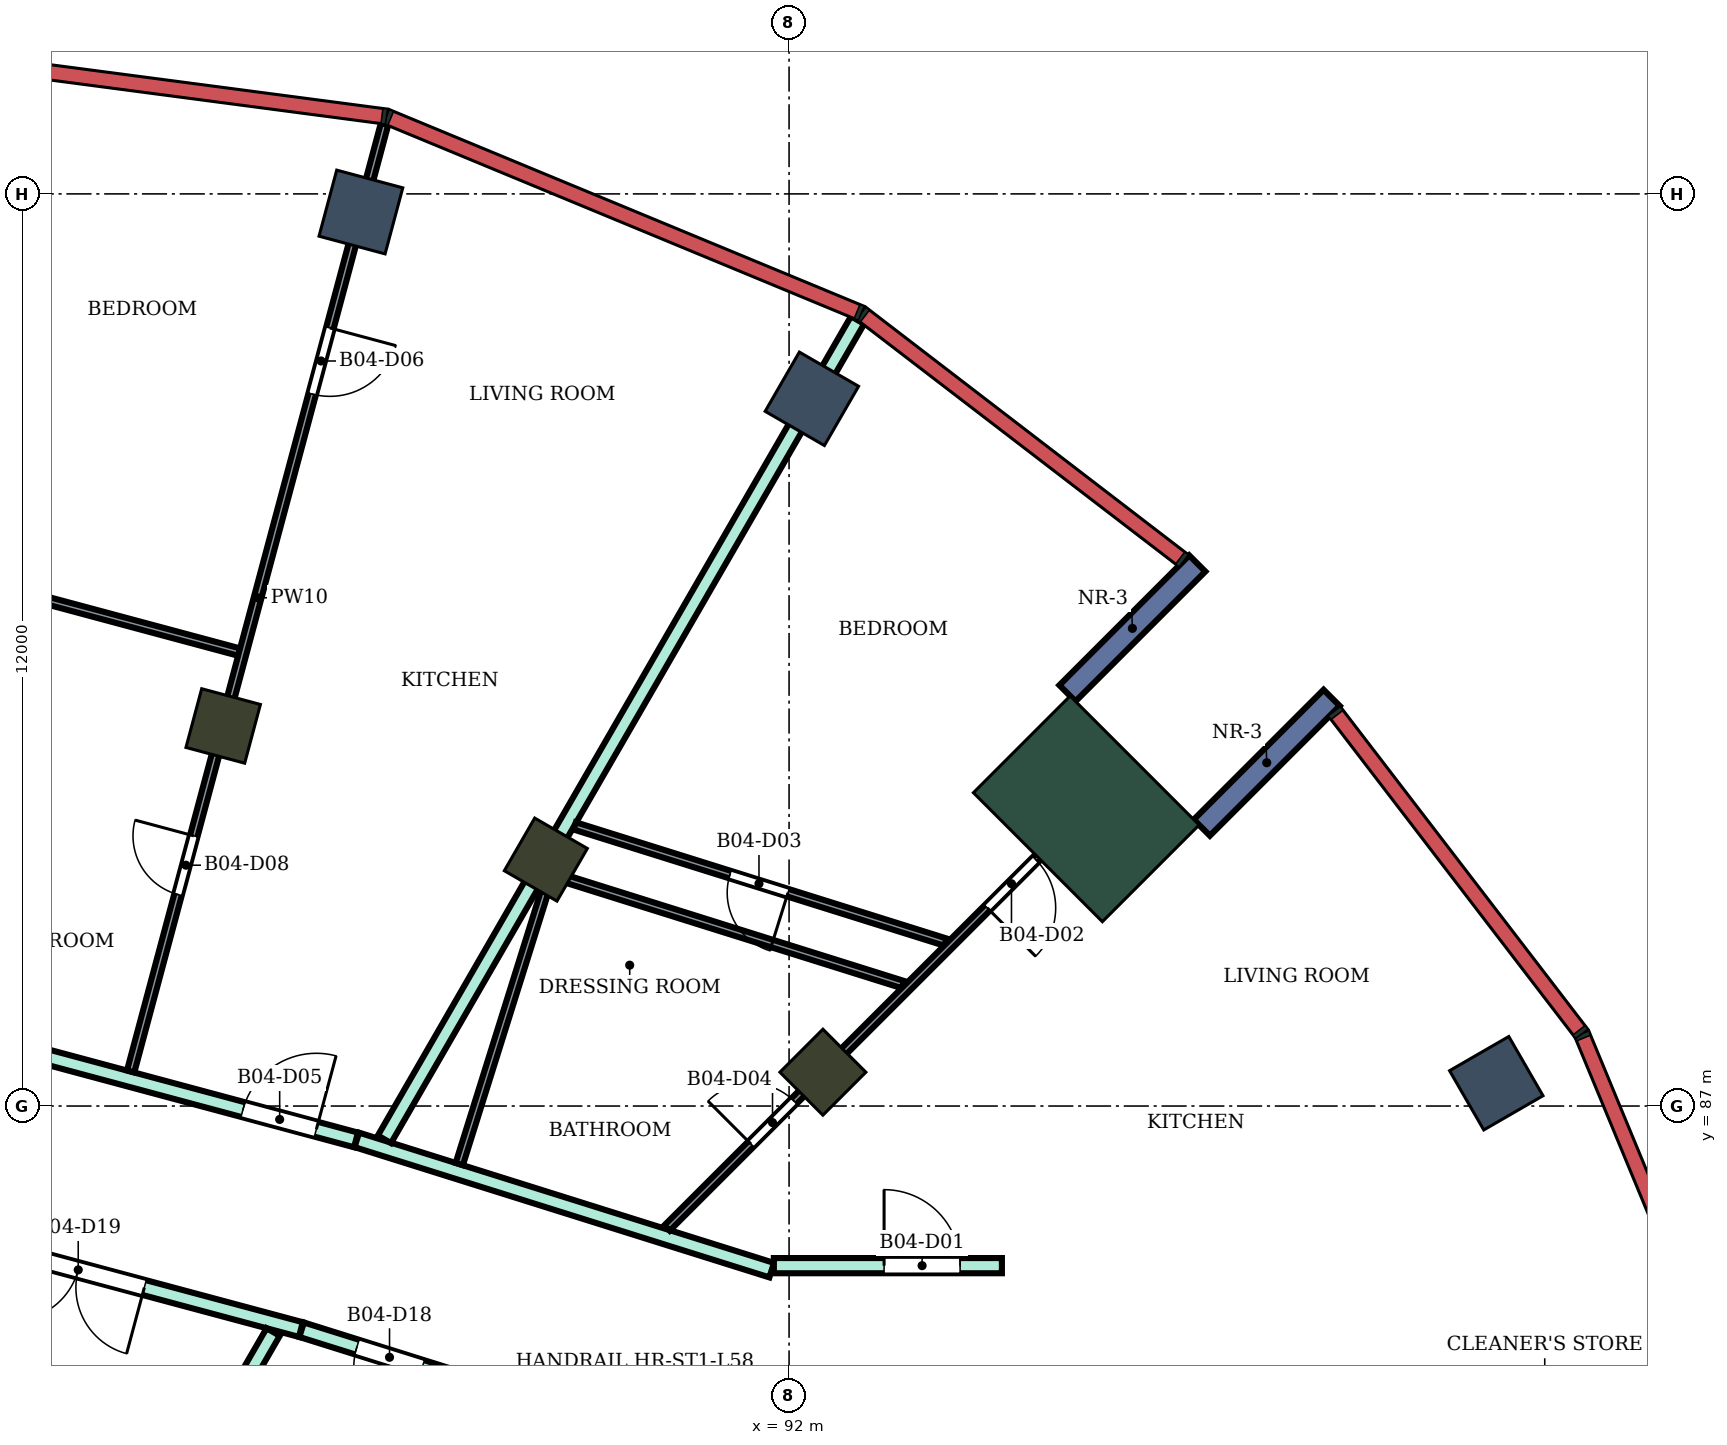
"""IFC4 building model, lengths in metres.
Left out: names, types, materials, properties, quantities, classifications, styles, units other than length and angle.
Written with IfcOpenShell. Run it as: python <this file> out.ifc"""

import sys

from ifc_helpers import new_model, si_unit, direction, frame, frame_2d, origin, origin_2d, place, context, subcontext, project, spatial, rectangle, extrude, element, fill, save


model = new_model("IFC4")
c1 = context("Model", 3, precision=1e-05, world=origin(), true_north=direction((0.0, 1.0)))
c2 = subcontext(c1, "Body", "Model", "MODEL_VIEW")
j1 = project(units=[si_unit("LENGTHUNIT", "METRE"), si_unit("PLANEANGLEUNIT", "RADIAN")], contexts=[c1])
p1 = place(None, origin())
s1 = spatial("IfcSite", under=j1, at=p1, CompositionType="ELEMENT")
p2 = place(p1, origin())
s2 = spatial("IfcBuilding", under=s1, at=p2, CompositionType="ELEMENT")
p3 = place(p2, frame((0.0, 0.0, 254.1)))
s3 = spatial("IfcBuildingStorey", under=s2, at=p3, CompositionType="ELEMENT", Elevation=254.1)
for number, where, z_axis, x_axis in (
    (1, (101.304, 87.3, 0.0), (0.0, 0.0, 1.0), (0.866, 0.5, 0.0)),
    (2, (92.3, 96.304, 0.0), (0.0, 0.0, 1.0), (0.5, 0.866, 0.0)),
    (3, (86.367, 98.762, 0.0), (0.0, 0.0, 1.0), (0.259, 0.966, 0.0)),
):
    element("IfcColumn", number, at=place(p3, frame(where, z_axis=z_axis, x_axis=x_axis)), inside=s3, PredefinedType="COLUMN", context=c2, shape_type="SweptSolid", body=[
        extrude(rectangle(XDim=0.9, YDim=0.9, at=origin_2d()), origin(), (0.0, 0.0, 1.0), 4.2),
    ])
for number, where, z_axis, x_axis in (
    (4, (92.445, 87.445, 0.0), (0.0, 0.0, 1.0), (0.707, 0.707, 0.0)),
    (5, (88.8, 90.242, 0.0), (0.0, 0.0, 1.0), (0.5, 0.866, 0.0)),
    (6, (84.555, 92.0, 0.0), (0.0, 0.0, 1.0), (0.259, 0.966, 0.0)),
):
    element("IfcColumn", number, at=place(p3, frame(where, z_axis=z_axis, x_axis=x_axis)), inside=s3, PredefinedType="COLUMN", context=c2, shape_type="SweptSolid", body=[
        extrude(rectangle(XDim=0.8, YDim=0.8, at=origin_2d()), origin(), (0.0, 0.0, 1.0), 4.2),
    ])
p4 = place(p3, frame((95.91, 90.91, 0.0), z_axis=(0.0, 0.0, 1.0), x_axis=(0.707106781187, 0.707106781187, 0.0)))
e7 = element("IfcColumn", 7, at=p4, inside=s3, PredefinedType="COLUMN", context=c2, shape_type="SweptSolid", body=[
    extrude(rectangle(XDim=1.8, YDim=2.4, at=origin_2d()), origin(), (0.0, 0.0, 1.0), 4.2),
])
for number, where, z_axis, x_axis in (
    (8, (97.43, 90.662, 0.0), (0.0, 0.0, 1.0), (0.707, 0.707, 0.0)),
    (9, (95.662, 92.43, 0.0), (0.0, 0.0, 1.0), (0.707, 0.707, 0.0)),
):
    element("IfcWall", number, at=place(p3, frame(where, z_axis=z_axis, x_axis=x_axis)), inside=s3, PredefinedType="NOTDEFINED", context=c2, shape_type="SweptSolid", body=[
        extrude(rectangle(XDim=2.416, YDim=0.3, at=frame_2d((1.208, 0.0))), origin(), (0.0, 0.0, 1.0), 4.2),
    ])
p5 = place(p3, frame((80.0, 85.554, 0.0), z_axis=(0.0, 0.0, 1.0), x_axis=(0.965894438951, -0.258936155845, 0.0)))
e10 = element("IfcWall", 10, at=p5, inside=s3, PredefinedType="PARTITIONING", context=c2, shape_type="SweptSolid", body=[
    extrude(rectangle(XDim=5.774, YDim=0.2, at=frame_2d((2.887, 0.0))), origin(), (0.0, 0.0, 1.0), 3.75),
])
p6 = place(p5, frame((1.841, 0.0, 0.0)))
e11 = element("IfcOpeningElement", 11, at=p6, cuts=e10, PredefinedType="OPENING", context=c2, shape_type="SweptSolid", body=[
    extrude(rectangle(XDim=1.8, YDim=2.1, at=frame_2d((0.9, 1.05))), frame((0.0, 0.11, 0.0), z_axis=(0.0, -1.0, 0.0), x_axis=(1.0, 0.0, 0.0)), (0.0, 0.0, 1.0), 0.22),
])
p7 = place(p3, frame((80.048, 88.233, 0.0), z_axis=(0.0, 0.0, 1.0), x_axis=(0.965787353661, -0.259335280109, 0.0)))
e12 = element("IfcWall", 12, at=p7, inside=s3, PredefinedType="PARTITIONING", context=c2, shape_type="SweptSolid", body=[
    extrude(rectangle(XDim=6.476, YDim=0.2, at=frame_2d((3.238, 0.0))), origin(), (0.0, 0.0, 1.0), 3.75),
])
p8 = place(p7, frame((4.936, 0.0, 0.0)))
e13 = element("IfcOpeningElement", 13, at=p8, cuts=e12, PredefinedType="OPENING", context=c2, shape_type="SweptSolid", body=[
    extrude(rectangle(XDim=1.0, YDim=2.1, at=frame_2d((0.5, 1.05))), frame((0.0, 0.11, 0.0), z_axis=(0.0, -1.0, 0.0), x_axis=(1.0, 0.0, 0.0)), (0.0, 0.0, 1.0), 0.22),
])
p9 = place(p3, frame((83.85, 81.668, 0.0), z_axis=(0.0, 0.0, 1.0), x_axis=(0.500099931433, 0.865967700657, 0.0)))
e14 = element("IfcWall", 14, at=p9, inside=s3, PredefinedType="PARTITIONING", context=c2, shape_type="SweptSolid", body=[
    extrude(rectangle(XDim=2.725, YDim=0.2, at=frame_2d((1.362, 0.0))), origin(), (0.0, 0.0, 1.0), 3.75),
])
p10 = place(p3, frame((85.587, 84.057, 0.0), z_axis=(0.0, 0.0, 1.0), x_axis=(0.954239513179, -0.299043393987, 0.0)))
e15 = element("IfcWall", 15, at=p10, inside=s3, PredefinedType="PARTITIONING", context=c2, shape_type="SweptSolid", body=[
    extrude(rectangle(XDim=2.424, YDim=0.2, at=frame_2d((1.212, 0.0))), origin(), (0.0, 0.0, 1.0), 3.75),
])
p11 = place(p10, frame((0.762, 0.0, 0.0)))
e16 = element("IfcOpeningElement", 16, at=p11, cuts=e15, PredefinedType="OPENING", context=c2, shape_type="SweptSolid", body=[
    extrude(rectangle(XDim=0.9, YDim=2.1, at=frame_2d((0.45, 1.05))), frame((0.0, 0.11, 0.0), z_axis=(0.0, -1.0, 0.0), x_axis=(1.0, 0.0, 0.0)), (0.0, 0.0, 1.0), 0.22),
])
p12 = place(p3, frame((86.313, 86.554, 0.0), z_axis=(0.0, 0.0, 1.0), x_axis=(0.954077387881, -0.29956024091, 0.0)))
e17 = element("IfcWall", 17, at=p12, inside=s3, PredefinedType="PARTITIONING", context=c2, shape_type="SweptSolid", body=[
    extrude(rectangle(XDim=5.72, YDim=0.2, at=frame_2d((2.86, 0.0))), origin(), (0.0, 0.0, 1.0), 3.75),
])
p13 = place(p3, frame((86.677, 86.562, 0.0), z_axis=(0.0, 0.0, 1.0), x_axis=(0.500139020429, 0.865945125424, 0.0)))
e18 = element("IfcWall", 18, at=p13, inside=s3, PredefinedType="PARTITIONING", context=c2, shape_type="SweptSolid", body=[
    extrude(rectangle(XDim=12.446, YDim=0.2, at=frame_2d((6.223, 0.0))), origin(), (0.0, 0.0, 1.0), 3.75),
])
p14 = place(p3, frame((91.8, 84.9, 0.0), z_axis=(0.0, 0.0, 1.0), x_axis=(1.0, 0.0, 0.0)))
e19 = element("IfcWall", 19, at=p14, inside=s3, PredefinedType="PARTITIONING", context=c2, shape_type="SweptSolid", body=[
    extrude(rectangle(XDim=3.0, YDim=0.2, at=frame_2d((1.5, 0.0))), origin(), (0.0, 0.0, 1.0), 3.75),
])
p15 = place(p14, frame((1.45, 0.0, 0.0)))
e20 = element("IfcOpeningElement", 20, at=p15, cuts=e19, PredefinedType="OPENING", context=c2, shape_type="SweptSolid", body=[
    extrude(rectangle(XDim=1.0, YDim=2.1, at=frame_2d((0.5, 1.05))), frame((0.0, 0.11, 0.0), z_axis=(0.0, -1.0, 0.0), x_axis=(1.0, 0.0, 0.0)), (0.0, 0.0, 1.0), 0.22),
])
p16 = place(p3, frame((80.058, 94.235, 0.0), z_axis=(0.0, 0.0, 1.0), x_axis=(0.965831212389, -0.259171891173, 0.0)))
e21 = element("IfcWall", 21, at=p16, inside=s3, PredefinedType="PARTITIONING", context=c2, shape_type="SweptSolid", body=[
    extrude(rectangle(XDim=4.872, YDim=0.1, at=frame_2d((2.436, 0.0))), origin(), (0.0, 0.0, 1.0), 3.75),
])
p17 = place(p16, frame((0.792, 0.0, 0.0)))
e22 = element("IfcOpeningElement", 22, at=p17, cuts=e21, PredefinedType="OPENING", context=c2, shape_type="SweptSolid", body=[
    extrude(rectangle(XDim=0.8, YDim=2.1, at=frame_2d((0.4, 1.05))), frame((0.0, 0.06, 0.0), z_axis=(0.0, -1.0, 0.0), x_axis=(1.0, 0.0, 0.0)), (0.0, 0.0, 1.0), 0.12),
])
p18 = place(p3, frame((83.338, 87.455, 0.0), z_axis=(0.0, 0.0, 1.0), x_axis=(0.25886596283, 0.965913253501, 0.0)))
e23 = element("IfcWall", 23, at=p18, inside=s3, PredefinedType="PARTITIONING", context=c2, shape_type="SweptSolid", body=[
    extrude(rectangle(XDim=12.904, YDim=0.1, at=frame_2d((6.452, 0.0))), origin(), (0.0, 0.0, 1.0), 3.75),
])
p19 = place(p18, frame((9.227, 0.0, 0.0)))
e24 = element("IfcOpeningElement", 24, at=p19, cuts=e23, PredefinedType="OPENING", context=c2, shape_type="SweptSolid", body=[
    extrude(rectangle(XDim=0.9, YDim=2.1, at=frame_2d((0.45, 1.05))), frame((0.0, 0.06, 0.0), z_axis=(0.0, -1.0, 0.0), x_axis=(1.0, 0.0, 0.0)), (0.0, 0.0, 1.0), 0.12),
])
p20 = place(p18, frame((2.409, 0.0, 0.0)))
e25 = element("IfcOpeningElement", 25, at=p20, cuts=e23, PredefinedType="OPENING", context=c2, shape_type="SweptSolid", body=[
    extrude(rectangle(XDim=0.8, YDim=2.1, at=frame_2d((0.4, 1.05))), frame((0.0, 0.06, 0.0), z_axis=(0.0, -1.0, 0.0), x_axis=(1.0, 0.0, 0.0)), (0.0, 0.0, 1.0), 0.12),
])
p21 = place(p3, frame((87.661, 86.236, 0.0), z_axis=(0.0, 0.0, 1.0), x_axis=(0.299267255743, 0.954169329648, 0.0)))
e26 = element("IfcWall", 26, at=p21, inside=s3, PredefinedType="PARTITIONING", context=c2, shape_type="SweptSolid", body=[
    extrude(rectangle(XDim=3.95, YDim=0.1, at=frame_2d((1.975, 0.0))), origin(), (0.0, 0.0, 1.0), 3.75),
])
p22 = place(p3, frame((88.858, 90.053, 0.0), z_axis=(0.0, 0.0, 1.0), x_axis=(0.954180222183, -0.299232524294, 0.0)))
e27 = element("IfcWall", 27, at=p22, inside=s3, PredefinedType="PARTITIONING", context=c2, shape_type="SweptSolid", body=[
    extrude(rectangle(XDim=4.863, YDim=0.1, at=frame_2d((2.431, 0.0))), origin(), (0.0, 0.0, 1.0), 3.75),
])
p23 = place(p3, frame((89.18, 90.685, 0.0), z_axis=(0.0, 0.0, 1.0), x_axis=(0.954251036713, -0.299006620215, 0.0)))
e28 = element("IfcWall", 28, at=p23, inside=s3, PredefinedType="PARTITIONING", context=c2, shape_type="SweptSolid", body=[
    extrude(rectangle(XDim=5.111, YDim=0.1, at=frame_2d((2.555, 0.0))), origin(), (0.0, 0.0, 1.0), 3.75),
])
p24 = place(p23, frame((2.14, 0.0, 0.0)))
e29 = element("IfcOpeningElement", 29, at=p24, cuts=e28, PredefinedType="OPENING", context=c2, shape_type="SweptSolid", body=[
    extrude(rectangle(XDim=0.8, YDim=2.1, at=frame_2d((0.4, 1.05))), frame((0.0, 0.06, 0.0), z_axis=(0.0, -1.0, 0.0), x_axis=(1.0, 0.0, 0.0)), (0.0, 0.0, 1.0), 0.12),
])
p25 = place(p3, frame((90.395, 85.395, 0.0), z_axis=(0.0, 0.0, 1.0), x_axis=(0.707279106146, 0.706934414221, 0.0)))
e30 = element("IfcWall", 30, at=p25, inside=s3, PredefinedType="PARTITIONING", context=c2, shape_type="SweptSolid", body=[
    extrude(rectangle(XDim=8.5, YDim=0.1, at=frame_2d((4.25, 0.0))), origin(), (0.0, 0.0, 1.0), 3.75),
])
p26 = place(p25, frame((5.957, 0.0, 0.0)))
e31 = element("IfcOpeningElement", 31, at=p26, cuts=e30, PredefinedType="OPENING", context=c2, shape_type="SweptSolid", body=[
    extrude(rectangle(XDim=0.9, YDim=2.1, at=frame_2d((0.45, 1.05))), frame((0.0, 0.06, 0.0), z_axis=(0.0, -1.0, 0.0), x_axis=(1.0, 0.0, 0.0)), (0.0, 0.0, 1.0), 0.12),
])
p27 = place(p25, frame((1.562, 0.0, 0.0)))
e32 = element("IfcOpeningElement", 32, at=p27, cuts=e30, PredefinedType="OPENING", context=c2, shape_type="SweptSolid", body=[
    extrude(rectangle(XDim=0.8, YDim=2.1, at=frame_2d((0.4, 1.05))), frame((0.0, 0.06, 0.0), z_axis=(0.0, -1.0, 0.0), x_axis=(1.0, 0.0, 0.0)), (0.0, 0.0, 1.0), 0.12),
])
p28 = place(p15, origin())
e33 = element("IfcDoor", 33, at=p28, inside=s3, OperationType="SINGLE_SWING_LEFT", PredefinedType="DOOR", context=c2, shape_type="SweptSolid", body=[
    extrude(rectangle(XDim=1.0, YDim=2.1, at=frame_2d((0.5, 1.05))), frame((0.0, 0.025, 0.0), z_axis=(0.0, -1.0, 0.0), x_axis=(1.0, 0.0, 0.0)), (0.0, 0.0, 1.0), 0.05),
])
fill(e20, e33)
p29 = place(p26, frame((0.9, 0.0, 0.0), z_axis=(0.0, 0.0, 1.0), x_axis=(-1.0, 0.0, 0.0)))
e34 = element("IfcDoor", 34, at=p29, inside=s3, OperationType="SINGLE_SWING_RIGHT", PredefinedType="DOOR", context=c2, shape_type="SweptSolid", body=[
    extrude(rectangle(XDim=0.9, YDim=2.1, at=frame_2d((0.45, 1.05))), frame((0.0, 0.025, 0.0), z_axis=(0.0, -1.0, 0.0), x_axis=(1.0, 0.0, 0.0)), (0.0, 0.0, 1.0), 0.05),
])
fill(e31, e34)
p30 = place(p24, frame((0.8, 0.0, 0.0), z_axis=(0.0, 0.0, 1.0), x_axis=(-1.0, 0.0, 0.0)))
e35 = element("IfcDoor", 35, at=p30, inside=s3, OperationType="SINGLE_SWING_LEFT", PredefinedType="DOOR", context=c2, shape_type="SweptSolid", body=[
    extrude(rectangle(XDim=0.8, YDim=2.1, at=frame_2d((0.4, 1.05))), frame((0.0, 0.025, 0.0), z_axis=(0.0, -1.0, 0.0), x_axis=(1.0, 0.0, 0.0)), (0.0, 0.0, 1.0), 0.05),
])
fill(e29, e35)
p31 = place(p27, origin())
e36 = element("IfcDoor", 36, at=p31, inside=s3, OperationType="SINGLE_SWING_LEFT", PredefinedType="DOOR", context=c2, shape_type="SweptSolid", body=[
    extrude(rectangle(XDim=0.8, YDim=2.1, at=frame_2d((0.4, 1.05))), frame((0.0, 0.025, 0.0), z_axis=(0.0, -1.0, 0.0), x_axis=(1.0, 0.0, 0.0)), (0.0, 0.0, 1.0), 0.05),
])
fill(e32, e36)
p32 = place(p8, origin())
e37 = element("IfcDoor", 37, at=p32, inside=s3, OperationType="SINGLE_SWING_RIGHT", PredefinedType="DOOR", context=c2, shape_type="SweptSolid", body=[
    extrude(rectangle(XDim=1.0, YDim=2.1, at=frame_2d((0.5, 1.05))), frame((0.0, 0.025, 0.0), z_axis=(0.0, -1.0, 0.0), x_axis=(1.0, 0.0, 0.0)), (0.0, 0.0, 1.0), 0.05),
])
fill(e13, e37)
p33 = place(p19, frame((0.9, 0.0, 0.0), z_axis=(0.0, 0.0, 1.0), x_axis=(-1.0, 0.0, 0.0)))
e38 = element("IfcDoor", 38, at=p33, inside=s3, OperationType="SINGLE_SWING_LEFT", PredefinedType="DOOR", context=c2, shape_type="SweptSolid", body=[
    extrude(rectangle(XDim=0.9, YDim=2.1, at=frame_2d((0.45, 1.05))), frame((0.0, 0.025, 0.0), z_axis=(0.0, -1.0, 0.0), x_axis=(1.0, 0.0, 0.0)), (0.0, 0.0, 1.0), 0.05),
])
fill(e24, e38)
p34 = place(p20, origin())
e39 = element("IfcDoor", 39, at=p34, inside=s3, OperationType="SINGLE_SWING_RIGHT", PredefinedType="DOOR", context=c2, shape_type="SweptSolid", body=[
    extrude(rectangle(XDim=0.8, YDim=2.1, at=frame_2d((0.4, 1.05))), frame((0.0, 0.025, 0.0), z_axis=(0.0, -1.0, 0.0), x_axis=(1.0, 0.0, 0.0)), (0.0, 0.0, 1.0), 0.05),
])
fill(e25, e39)
p35 = place(p11, frame((0.9, 0.0, 0.0), z_axis=(0.0, 0.0, 1.0), x_axis=(-1.0, 0.0, 0.0)))
e40 = element("IfcDoor", 40, at=p35, inside=s3, OperationType="SINGLE_SWING_LEFT", PredefinedType="DOOR", context=c2, shape_type="SweptSolid", body=[
    extrude(rectangle(XDim=0.9, YDim=2.1, at=frame_2d((0.45, 1.05))), frame((0.0, 0.025, 0.0), z_axis=(0.0, -1.0, 0.0), x_axis=(1.0, 0.0, 0.0)), (0.0, 0.0, 1.0), 0.05),
])
fill(e16, e40)
p36 = place(p6, frame((1.8, 0.0, 0.0), z_axis=(0.0, 0.0, 1.0), x_axis=(-1.0, 0.0, 0.0)))
e41 = element("IfcDoor", 41, at=p36, inside=s3, OperationType="DOUBLE_DOOR_SINGLE_SWING", PredefinedType="DOOR", context=c2, shape_type="SweptSolid", body=[
    extrude(rectangle(XDim=1.8, YDim=2.1, at=frame_2d((0.9, 1.05))), frame((0.0, 0.025, 0.0), z_axis=(0.0, -1.0, 0.0), x_axis=(1.0, 0.0, 0.0)), (0.0, 0.0, 1.0), 0.05),
])
fill(e11, e41)
save(model, sys.argv[1])
